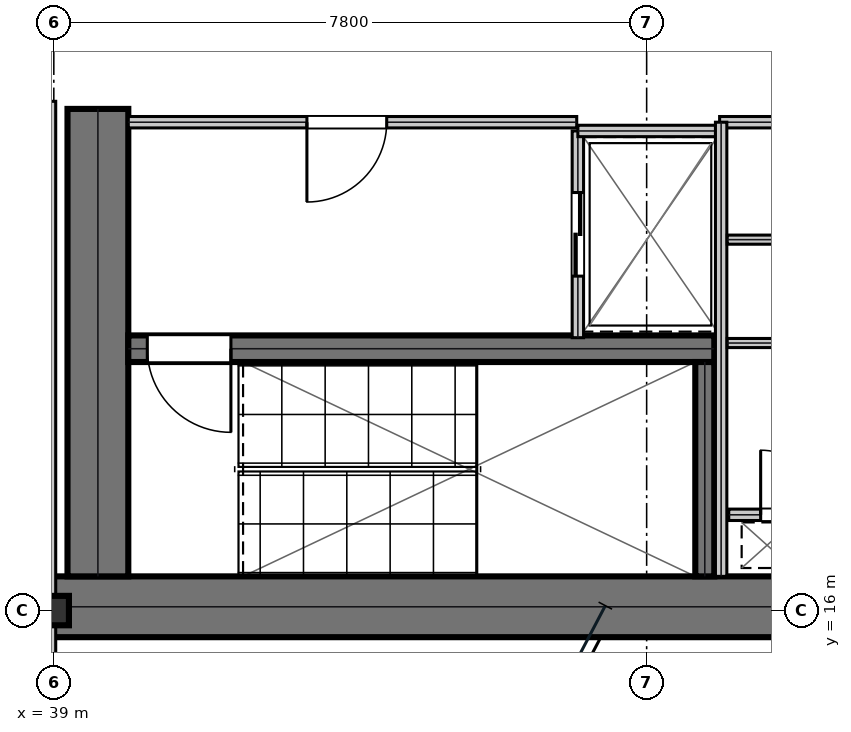
"""IFC4 building model, lengths in metres.
Left out: names, types, materials, properties, quantities, classifications, styles, units other than length and angle.
Written with IfcOpenShell. Run it as: python <this file> out.ifc"""

import sys

from ifc_helpers import new_model, si_unit, direction, frame, frame_2d, origin, origin_2d, place, context, subcontext, project, spatial, rectangle, i_section, extrude, element, fill, save


model = new_model("IFC4")
c1 = context("Model", 3, precision=1e-05, world=origin(), true_north=direction((0.0, 1.0)))
c2 = subcontext(c1, "Body", "Model", "MODEL_VIEW")
j1 = project(units=[si_unit("LENGTHUNIT", "METRE"), si_unit("PLANEANGLEUNIT", "RADIAN")], contexts=[c1])
p1 = place(None, origin())
s1 = spatial("IfcSite", under=j1, at=p1, CompositionType="ELEMENT")
p2 = place(p1, origin())
s2 = spatial("IfcBuilding", under=s1, at=p2, CompositionType="ELEMENT")
p3 = place(p2, frame((0.0, 0.0, 145.2)))
s3 = spatial("IfcBuildingStorey", under=s2, at=p3, CompositionType="ELEMENT", Elevation=145.2)
p4 = place(p3, frame((38.8, 16.05, 0.0), z_axis=(0.0, 0.0, 1.0), x_axis=(1.0, 0.0, 0.0)))
e1 = element("IfcWall", 1, at=p4, inside=s3, PredefinedType="SHEAR", context=c2, shape_type="SweptSolid", body=[
    extrude(rectangle(XDim=16.0, YDim=0.8, at=frame_2d((8.0, 0.0))), origin(), (0.0, 0.0, 1.0), 3.81),
])
p5 = place(p3, frame((39.58, 16.45, 0.0), z_axis=(0.0, 0.0, 1.0), x_axis=(0.0, 1.0, 0.0)))
e2 = element("IfcWall", 2, at=p5, inside=s3, PredefinedType="SHEAR", context=c2, shape_type="SweptSolid", body=[
    extrude(rectangle(XDim=6.15, YDim=0.8, at=frame_2d((3.075, 0.0))), origin(), (0.0, 0.0, 1.0), 3.81),
])
p6 = place(p3, frame((39.98, 19.445, 0.0), z_axis=(0.0, 0.0, 1.0), x_axis=(1.0, 0.0, 0.0)))
e3 = element("IfcWall", 3, at=p6, inside=s3, PredefinedType="SHEAR", context=c2, shape_type="SweptSolid", body=[
    extrude(rectangle(XDim=7.71, YDim=0.35, at=frame_2d((3.855, 0.0))), origin(), (0.0, 0.0, 1.0), 3.81),
])
p7 = place(p6, frame((0.25, 0.0, 0.0)))
e4 = element("IfcOpeningElement", 4, at=p7, cuts=e3, PredefinedType="OPENING", context=c2, shape_type="SweptSolid", body=[
    extrude(rectangle(XDim=1.1, YDim=2.15, at=frame_2d((0.55, 1.075))), frame((0.0, 0.185, 0.0), z_axis=(0.0, -1.0, 0.0), x_axis=(1.0, 0.0, 0.0)), (0.0, 0.0, 1.0), 0.37),
])
p8 = place(p3, frame((47.565, 16.45, 0.0), z_axis=(0.0, 0.0, 1.0), x_axis=(0.0, 1.0, 0.0)))
e5 = element("IfcWall", 5, at=p8, inside=s3, PredefinedType="SHEAR", context=c2, shape_type="SweptSolid", body=[
    extrude(rectangle(XDim=2.82, YDim=0.25, at=frame_2d((1.41, 0.0))), origin(), (0.0, 0.0, 1.0), 3.81),
])
p9 = place(p3, frame((39.0, 16.0, 0.0), z_axis=(0.0, 0.0, 1.0), x_axis=(1.0, 0.0, 0.0)))
e6 = element("IfcColumn", 6, at=p9, inside=s3, PredefinedType="COLUMN", context=c2, shape_type="SweptSolid", body=[
    extrude(i_section(OverallWidth=0.398, OverallDepth=0.387, WebThickness=0.021, FlangeThickness=0.033, at=origin_2d()), origin(), (0.0, 0.0, 1.0), 4.044),
])
p10 = place(p3, frame((39.98, 22.425, 0.0), z_axis=(0.0, 0.0, 1.0), x_axis=(1.0, 0.0, 0.0)))
e7 = element("IfcWall", 7, at=p10, inside=s3, PredefinedType="PARTITIONING", context=c2, shape_type="SweptSolid", body=[
    extrude(rectangle(XDim=5.9, YDim=0.15, at=frame_2d((2.95, 0.0))), origin(), (0.0, 0.0, 1.0), 3.81),
])
p11 = place(p10, frame((2.35, 0.0, 0.0)))
e8 = element("IfcOpeningElement", 8, at=p11, cuts=e7, PredefinedType="OPENING", context=c2, shape_type="SweptSolid", body=[
    extrude(rectangle(XDim=1.05, YDim=2.15, at=frame_2d((0.525, 1.075))), frame((0.0, 0.085, 0.0), z_axis=(0.0, -1.0, 0.0), x_axis=(1.0, 0.0, 0.0)), (0.0, 0.0, 1.0), 0.17),
])
p12 = place(p3, frame((45.895, 19.59, 0.0), z_axis=(0.0, 0.0, 1.0), x_axis=(0.0, 1.0, 0.0)))
e9 = element("IfcWall", 9, at=p12, inside=s3, PredefinedType="PARTITIONING", context=c2, shape_type="SweptSolid", body=[
    extrude(rectangle(XDim=2.72, YDim=0.15, at=frame_2d((1.36, 0.0))), origin(), (0.0, 0.0, 1.0), 3.81),
])
p13 = place(p12, frame((0.81, 0.0, 0.0)))
e10 = element("IfcOpeningElement", 10, at=p13, cuts=e9, PredefinedType="OPENING", context=c2, shape_type="SweptSolid", body=[
    extrude(rectangle(XDim=1.1, YDim=2.15, at=frame_2d((0.55, 1.075))), frame((0.0, 0.085, 0.0), z_axis=(0.0, -1.0, 0.0), x_axis=(1.0, 0.0, 0.0)), (0.0, 0.0, 1.0), 0.17),
])
p14 = place(p3, frame((45.895, 22.31, 0.0), z_axis=(0.0, 0.0, 1.0), x_axis=(1.0, 0.0, 0.0)))
e11 = element("IfcWall", 11, at=p14, inside=s3, PredefinedType="PARTITIONING", context=c2, shape_type="SweptSolid", body=[
    extrude(rectangle(XDim=1.915, YDim=0.15, at=frame_2d((0.958, 0.0))), origin(), (0.0, 0.0, 1.0), 3.81),
])
p15 = place(p3, frame((47.88, 17.26, 0.0), z_axis=(0.0, 0.0, 1.0), x_axis=(1.0, 0.0, 0.0)))
e12 = element("IfcWall", 12, at=p15, inside=s3, PredefinedType="PARTITIONING", context=c2, shape_type="SweptSolid", body=[
    extrude(rectangle(XDim=1.72, YDim=0.15, at=frame_2d((0.86, 0.0))), origin(), (0.0, 0.0, 1.0), 3.81),
])
p16 = place(p15, frame((0.42, 0.0, 0.0)))
e13 = element("IfcOpeningElement", 13, at=p16, cuts=e12, PredefinedType="OPENING", context=c2, shape_type="SweptSolid", body=[
    extrude(rectangle(XDim=0.85, YDim=2.15, at=frame_2d((0.425, 1.075))), frame((0.0, 0.085, 0.0), z_axis=(0.0, -1.0, 0.0), x_axis=(1.0, 0.0, 0.0)), (0.0, 0.0, 1.0), 0.17),
])
p17 = place(p3, frame((47.76, 22.425, 0.0), z_axis=(0.0, 0.0, 1.0), x_axis=(1.0, 0.0, 0.0)))
e14 = element("IfcWall", 14, at=p17, inside=s3, PredefinedType="PARTITIONING", context=c2, shape_type="SweptSolid", body=[
    extrude(rectangle(XDim=1.96, YDim=0.15, at=frame_2d((0.98, 0.0))), origin(), (0.0, 0.0, 1.0), 3.81),
])
p18 = place(p3, frame((47.78, 16.45, 0.0), z_axis=(0.0, 0.0, 1.0), x_axis=(0.0, 1.0, 0.0)))
e15 = element("IfcWall", 15, at=p18, inside=s3, PredefinedType="PARTITIONING", context=c2, shape_type="SweptSolid", body=[
    extrude(rectangle(XDim=5.975, YDim=0.15, at=frame_2d((2.988, 0.0))), origin(), (0.0, 0.0, 1.0), 3.81),
])
for number, where, z_axis, x_axis in (
    (16, (47.86, 19.52, 0.0), (0.0, 0.0, 1.0), (1.0, 0.0, 0.0)),
    (17, (47.86, 20.88, 0.0), (0.0, 0.0, 1.0), (1.0, 0.0, 0.0)),
):
    element("IfcWall", number, at=place(p3, frame(where, z_axis=z_axis, x_axis=x_axis)), inside=s3, PredefinedType="PARTITIONING", context=c2, shape_type="SweptSolid", body=[
        extrude(rectangle(XDim=1.76, YDim=0.12, at=frame_2d((0.88, 0.0))), origin(), (0.0, 0.0, 1.0), 3.81),
    ])
p19 = place(p3, frame((38.95, 14.5, 0.0), z_axis=(0.0, 0.0, 1.0), x_axis=(0.0, 1.0, 0.0)))
e18 = element("IfcWall", 18, at=p19, inside=s3, PredefinedType="PARTITIONING", context=c2, shape_type="SweptSolid", body=[
    extrude(rectangle(XDim=8.2, YDim=0.15, at=frame_2d((4.1, 0.0))), origin(), (0.0, 0.0, 1.0), 3.19),
])
p20 = place(p11, frame((1.05, 0.0, 0.0), z_axis=(0.0, 0.0, 1.0), x_axis=(-1.0, 0.0, 0.0)))
e19 = element("IfcDoor", 19, at=p20, inside=s3, OperationType="SINGLE_SWING_RIGHT", PredefinedType="DOOR", context=c2, shape_type="SweptSolid", body=[
    extrude(rectangle(XDim=1.05, YDim=2.15, at=frame_2d((0.525, 1.075))), frame((0.0, 0.025, 0.0), z_axis=(0.0, -1.0, 0.0), x_axis=(1.0, 0.0, 0.0)), (0.0, 0.0, 1.0), 0.05),
])
fill(e8, e19)
p21 = place(p13, frame((1.1, 0.0, 0.0), z_axis=(0.0, 0.0, 1.0), x_axis=(-1.0, 0.0, 0.0)))
e20 = element("IfcDoor", 20, at=p21, inside=s3, OperationType="DOUBLE_DOOR_SLIDING", PredefinedType="DOOR", context=c2, shape_type="SweptSolid", body=[
    extrude(rectangle(XDim=1.1, YDim=2.15, at=frame_2d((0.55, 1.075))), frame((0.0, 0.025, 0.0), z_axis=(0.0, -1.0, 0.0), x_axis=(1.0, 0.0, 0.0)), (0.0, 0.0, 1.0), 0.05),
])
fill(e10, e20)
p22 = place(p16, origin())
e21 = element("IfcDoor", 21, at=p22, inside=s3, OperationType="SINGLE_SWING_LEFT", PredefinedType="TRAPDOOR", context=c2, shape_type="SweptSolid", body=[
    extrude(rectangle(XDim=0.85, YDim=2.15, at=frame_2d((0.425, 1.075))), frame((0.0, 0.025, 0.0), z_axis=(0.0, -1.0, 0.0), x_axis=(1.0, 0.0, 0.0)), (0.0, 0.0, 1.0), 0.05),
])
fill(e13, e21)
p23 = place(p7, frame((1.1, 0.0, 0.0), z_axis=(0.0, 0.0, 1.0), x_axis=(-1.0, 0.0, 0.0)))
e22 = element("IfcDoor", 22, at=p23, inside=s3, OperationType="SINGLE_SWING_LEFT", PredefinedType="DOOR", context=c2, shape_type="SweptSolid", body=[
    extrude(rectangle(XDim=1.1, YDim=2.15, at=frame_2d((0.55, 1.075))), frame((0.0, 0.025, 0.0), z_axis=(0.0, -1.0, 0.0), x_axis=(1.0, 0.0, 0.0)), (0.0, 0.0, 1.0), 0.05),
])
fill(e4, e22)
save(model, sys.argv[1])
